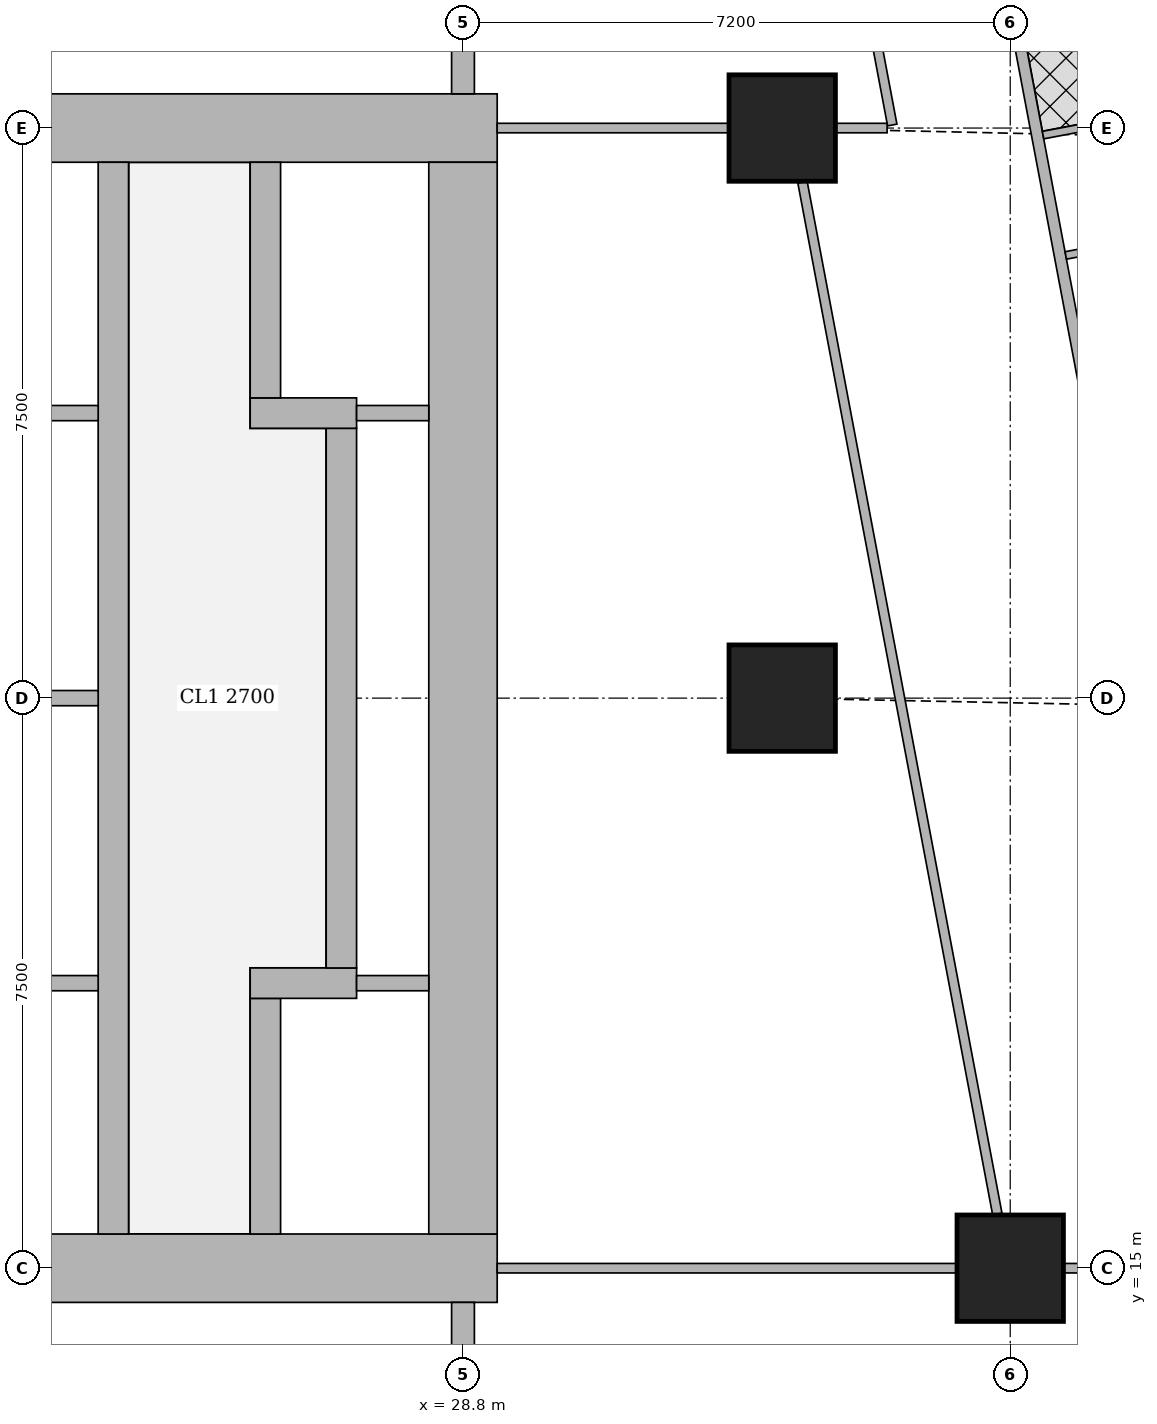
"""IFC4 building model, lengths in metres.
Left out: names, types, materials, properties, quantities, classifications, styles, units other than length and angle.
Written with IfcOpenShell. Run it as: python <this file> out.ifc"""

import sys

from ifc_helpers import new_model, si_unit, direction, frame, frame_2d, origin, origin_2d, place, context, subcontext, project, spatial, rectangle, extrude, element, fill, save


model = new_model("IFC4")
c1 = context("Model", 3, precision=1e-05, world=origin(), true_north=direction((0.0, 1.0)))
c2 = subcontext(c1, "Body", "Model", "MODEL_VIEW")
j1 = project(units=[si_unit("LENGTHUNIT", "METRE"), si_unit("PLANEANGLEUNIT", "RADIAN")], contexts=[c1])
p1 = place(None, origin())
s1 = spatial("IfcSite", under=j1, at=p1, CompositionType="ELEMENT")
p2 = place(p1, origin())
s2 = spatial("IfcBuilding", under=s1, at=p2, CompositionType="ELEMENT")
p3 = place(p2, frame((0.0, 0.0, 285.35)))
s3 = spatial("IfcBuildingStorey", under=s2, at=p3, CompositionType="ELEMENT", Elevation=285.35)
for number, where, z_axis, x_axis in (
    (1, (36.0, 15.0, 0.0), (0.0, 0.0, 1.0), (1.0, 0.0, 0.0)),
    (2, (33.0, 22.5, 0.0), (0.0, 0.0, 1.0), (1.0, 0.0, 0.0)),
    (3, (33.0, 30.0, 0.0), (0.0, 0.0, 1.0), (1.0, 0.0, 0.0)),
):
    element("IfcColumn", number, at=place(p3, frame(where, z_axis=z_axis, x_axis=x_axis)), inside=s3, PredefinedType="COLUMN", context=c2, shape_type="SweptSolid", body=[
        extrude(rectangle(XDim=1.4, YDim=1.4, at=origin_2d()), origin(), (0.0, 0.0, 1.0), 3.75),
    ])
p4 = place(p3, frame((13.95, 15.0, 0.0), z_axis=(0.0, 0.0, 1.0), x_axis=(1.0, 0.0, 0.0)))
e4 = element("IfcWall", 4, at=p4, inside=s3, PredefinedType="SHEAR", context=c2, shape_type="SweptSolid", body=[
    extrude(rectangle(XDim=15.3, YDim=0.9, at=frame_2d((7.65, 0.0))), origin(), (0.0, 0.0, 1.0), 3.75),
])
p5 = place(p4, frame((4.45, 0.0, 0.0)))
e5 = element("IfcOpeningElement", 5, at=p5, cuts=e4, PredefinedType="OPENING", context=c2, shape_type="SweptSolid", body=[
    extrude(rectangle(XDim=1.8, YDim=2.1, at=frame_2d((0.9, 1.05))), frame((0.0, 0.46, 0.0), z_axis=(0.0, -1.0, 0.0), x_axis=(1.0, 0.0, 0.0)), (0.0, 0.0, 1.0), 0.92),
])
p6 = place(p4, frame((10.7, 0.0, 0.0)))
e6 = element("IfcOpeningElement", 6, at=p6, cuts=e4, PredefinedType="OPENING", context=c2, shape_type="SweptSolid", body=[
    extrude(rectangle(XDim=1.1, YDim=2.1, at=frame_2d((0.55, 1.05))), frame((0.0, 0.46, 0.0), z_axis=(0.0, -1.0, 0.0), x_axis=(1.0, 0.0, 0.0)), (0.0, 0.0, 1.0), 0.92),
])
p7 = place(p3, frame((13.95, 30.0, 0.0), z_axis=(0.0, 0.0, 1.0), x_axis=(1.0, 0.0, 0.0)))
e7 = element("IfcWall", 7, at=p7, inside=s3, PredefinedType="SHEAR", context=c2, shape_type="SweptSolid", body=[
    extrude(rectangle(XDim=15.3, YDim=0.9, at=frame_2d((7.65, 0.0))), origin(), (0.0, 0.0, 1.0), 3.75),
])
p8 = place(p7, frame((4.45, 0.0, 0.0)))
e8 = element("IfcOpeningElement", 8, at=p8, cuts=e7, PredefinedType="OPENING", context=c2, shape_type="SweptSolid", body=[
    extrude(rectangle(XDim=1.8, YDim=2.1, at=frame_2d((0.9, 1.05))), frame((0.0, 0.46, 0.0), z_axis=(0.0, -1.0, 0.0), x_axis=(1.0, 0.0, 0.0)), (0.0, 0.0, 1.0), 0.92),
])
p9 = place(p7, frame((10.7, 0.0, 0.0)))
e9 = element("IfcOpeningElement", 9, at=p9, cuts=e7, PredefinedType="OPENING", context=c2, shape_type="SweptSolid", body=[
    extrude(rectangle(XDim=1.1, YDim=2.1, at=frame_2d((0.55, 1.05))), frame((0.0, 0.46, 0.0), z_axis=(0.0, -1.0, 0.0), x_axis=(1.0, 0.0, 0.0)), (0.0, 0.0, 1.0), 0.92),
])
p10 = place(p3, frame((28.8, 15.45, 0.0), z_axis=(0.0, 0.0, 1.0), x_axis=(0.0, 1.0, 0.0)))
e10 = element("IfcWall", 10, at=p10, inside=s3, PredefinedType="SHEAR", context=c2, shape_type="SweptSolid", body=[
    extrude(rectangle(XDim=14.1, YDim=0.9, at=frame_2d((7.05, 0.0))), origin(), (0.0, 0.0, 1.0), 3.75),
])
p11 = place(p3, frame((24.2, 15.45, 0.0), z_axis=(0.0, 0.0, 1.0), x_axis=(0.0, 1.0, 0.0)))
e11 = element("IfcWall", 11, at=p11, inside=s3, PredefinedType="SHEAR", context=c2, shape_type="SweptSolid", body=[
    extrude(rectangle(XDim=14.1, YDim=0.4, at=frame_2d((7.05, 0.0))), origin(), (0.0, 0.0, 1.0), 3.75),
])
p12 = place(p3, frame((26.2, 15.45, 0.0), z_axis=(0.0, 0.0, 1.0), x_axis=(0.0, 1.0, 0.0)))
e12 = element("IfcWall", 12, at=p12, inside=s3, PredefinedType="SHEAR", context=c2, shape_type="SweptSolid", body=[
    extrude(rectangle(XDim=3.1, YDim=0.4, at=frame_2d((1.55, 0.0))), origin(), (0.0, 0.0, 1.0), 3.75),
])
p13 = place(p12, frame((0.825, 0.0, 0.0)))
e13 = element("IfcOpeningElement", 13, at=p13, cuts=e12, PredefinedType="OPENING", context=c2, shape_type="SweptSolid", body=[
    extrude(rectangle(XDim=1.2, YDim=2.1, at=frame_2d((0.6, 1.05))), frame((0.0, 0.21, 0.0), z_axis=(0.0, -1.0, 0.0), x_axis=(1.0, 0.0, 0.0)), (0.0, 0.0, 1.0), 0.42),
])
p14 = place(p3, frame((26.0, 18.75, 0.0), z_axis=(0.0, 0.0, 1.0), x_axis=(1.0, 0.0, 0.0)))
e14 = element("IfcWall", 14, at=p14, inside=s3, PredefinedType="SHEAR", context=c2, shape_type="SweptSolid", body=[
    extrude(rectangle(XDim=1.4, YDim=0.4, at=frame_2d((0.7, 0.0))), origin(), (0.0, 0.0, 1.0), 3.75),
])
p15 = place(p3, frame((27.2, 18.95, 0.0), z_axis=(0.0, 0.0, 1.0), x_axis=(0.0, 1.0, 0.0)))
e15 = element("IfcWall", 15, at=p15, inside=s3, PredefinedType="SHEAR", context=c2, shape_type="SweptSolid", body=[
    extrude(rectangle(XDim=7.1, YDim=0.4, at=frame_2d((3.55, 0.0))), origin(), (0.0, 0.0, 1.0), 3.75),
])
p16 = place(p3, frame((26.0, 26.25, 0.0), z_axis=(0.0, 0.0, 1.0), x_axis=(1.0, 0.0, 0.0)))
e16 = element("IfcWall", 16, at=p16, inside=s3, PredefinedType="SHEAR", context=c2, shape_type="SweptSolid", body=[
    extrude(rectangle(XDim=1.4, YDim=0.4, at=frame_2d((0.7, 0.0))), origin(), (0.0, 0.0, 1.0), 3.75),
])
p17 = place(p3, frame((26.2, 26.45, 0.0), z_axis=(0.0, 0.0, 1.0), x_axis=(0.0, 1.0, 0.0)))
e17 = element("IfcWall", 17, at=p17, inside=s3, PredefinedType="SHEAR", context=c2, shape_type="SweptSolid", body=[
    extrude(rectangle(XDim=3.1, YDim=0.4, at=frame_2d((1.55, 0.0))), origin(), (0.0, 0.0, 1.0), 3.75),
])
p18 = place(p17, frame((1.075, 0.0, 0.0)))
e18 = element("IfcOpeningElement", 18, at=p18, cuts=e17, PredefinedType="OPENING", context=c2, shape_type="SweptSolid", body=[
    extrude(rectangle(XDim=1.2, YDim=2.1, at=frame_2d((0.6, 1.05))), frame((0.0, 0.21, 0.0), z_axis=(0.0, -1.0, 0.0), x_axis=(1.0, 0.0, 0.0)), (0.0, 0.0, 1.0), 0.42),
])
for number, where, z_axis, x_axis in (
    (19, (28.8, 10.35, 0.0), (0.0, 0.0, 1.0), (0.0, 1.0, 0.0)),
    (20, (28.8, 30.45, 0.0), (0.0, 0.0, 1.0), (0.0, 1.0, 0.0)),
):
    element("IfcWall", number, at=place(p3, frame(where, z_axis=z_axis, x_axis=x_axis)), inside=s3, PredefinedType="SHEAR", context=c2, shape_type="SweptSolid", body=[
        extrude(rectangle(XDim=4.2, YDim=0.3, at=frame_2d((2.1, 0.0))), origin(), (0.0, 0.0, 1.0), 3.75),
    ])
p19 = place(p3, frame((34.036, 42.186, 0.0), z_axis=(0.0, 0.0, 1.0), x_axis=(0.185593518645, -0.9826266055, 0.0)))
e21 = element("IfcWall", 21, at=p19, inside=s3, PredefinedType="SOLIDWALL", context=c2, shape_type="SweptSolid", body=[
    extrude(rectangle(XDim=35.961, YDim=0.15, at=frame_2d((17.98, 0.0))), origin(), (0.0, 0.0, 1.0), 2.5),
])
p20 = place(p19, frame((19.345, 0.0, 0.0)))
e22 = element("IfcOpeningElement", 22, at=p20, cuts=e21, PredefinedType="OPENING", context=c2, shape_type="SweptSolid", body=[
    extrude(rectangle(XDim=1.0, YDim=2.1, at=frame_2d((0.5, 1.05))), frame((0.0, 0.085, 0.0), z_axis=(0.0, -1.0, 0.0), x_axis=(1.0, 0.0, 0.0)), (0.0, 0.0, 1.0), 0.17),
])
p21 = place(p19, frame((33.774, 0.0, 0.0)))
e23 = element("IfcOpeningElement", 23, at=p21, cuts=e21, PredefinedType="OPENING", context=c2, shape_type="SweptSolid", body=[
    extrude(rectangle(XDim=1.0, YDim=2.1, at=frame_2d((0.5, 1.05))), frame((0.0, 0.085, 0.0), z_axis=(0.0, -1.0, 0.0), x_axis=(1.0, 0.0, 0.0)), (0.0, 0.0, 1.0), 0.17),
])
p22 = place(p3, frame((39.948, 28.932, 0.0), z_axis=(0.0, 0.0, 1.0), x_axis=(-0.982610347627, -0.185679575441, 0.0)))
e24 = element("IfcWall", 24, at=p22, inside=s3, PredefinedType="PARTITIONING", context=c2, shape_type="SweptSolid", body=[
    extrude(rectangle(XDim=3.274, YDim=0.1, at=frame_2d((1.637, 0.0))), origin(), (0.0, 0.0, 1.0), 3.5),
])
p23 = place(p3, frame((39.649, 30.515, 0.0), z_axis=(0.0, 0.0, 1.0), x_axis=(-0.982610347627, -0.185679575441, 0.0)))
e25 = element("IfcWall", 25, at=p23, inside=s3, PredefinedType="PARTITIONING", context=c2, shape_type="SweptSolid", body=[
    extrude(rectangle(XDim=3.274, YDim=0.1, at=frame_2d((1.637, 0.0))), origin(), (0.0, 0.0, 1.0), 2.5),
])
p24 = place(p3, frame((34.448, 30.04, 0.0), z_axis=(0.0, 0.0, 1.0), x_axis=(-0.185749459238, 0.982597139418, 0.0)))
e26 = element("IfcWall", 26, at=p24, inside=s3, PredefinedType="PARTITIONING", context=c2, shape_type="SweptSolid", body=[
    extrude(rectangle(XDim=4.883, YDim=0.125, at=frame_2d((2.441, 0.0))), origin(), (0.0, 0.0, 1.0), 2.5),
])
p25 = place(p24, frame((0.95, 0.0, 0.0)))
e27 = element("IfcOpeningElement", 27, at=p25, cuts=e26, PredefinedType="OPENING", context=c2, shape_type="SweptSolid", body=[
    extrude(rectangle(XDim=1.0, YDim=2.1, at=frame_2d((0.5, 1.05))), frame((0.0, 0.073, 0.0), z_axis=(0.0, -1.0, 0.0), x_axis=(1.0, 0.0, 0.0)), (0.0, 0.0, 1.0), 0.145),
])
p26 = place(p24, frame((3.225, 0.0, 0.0)))
e28 = element("IfcOpeningElement", 28, at=p26, cuts=e26, PredefinedType="OPENING", context=c2, shape_type="SweptSolid", body=[
    extrude(rectangle(XDim=1.0, YDim=2.1, at=frame_2d((0.5, 1.05))), frame((0.0, 0.073, 0.0), z_axis=(0.0, -1.0, 0.0), x_axis=(1.0, 0.0, 0.0)), (0.0, 0.0, 1.0), 0.145),
])
p27 = place(p3, frame((35.83, 15.713, 0.0), z_axis=(0.0, 0.0, 1.0), x_axis=(-0.185534724166, 0.982637708481, 0.0)))
e29 = element("IfcWall", 29, at=p27, inside=s3, PredefinedType="PARTITIONING", context=c2, shape_type="SweptSolid", body=[
    extrude(rectangle(XDim=13.814, YDim=0.125, at=frame_2d((6.907, 0.0))), origin(), (0.0, 0.0, 1.0), 2.5),
])
p28 = place(p27, frame((5.35, 0.0, 0.0)))
e30 = element("IfcOpeningElement", 30, at=p28, cuts=e29, PredefinedType="OPENING", context=c2, shape_type="SweptSolid", body=[
    extrude(rectangle(XDim=1.0, YDim=2.1, at=frame_2d((0.5, 1.05))), frame((0.0, 0.073, 0.0), z_axis=(0.0, -1.0, 0.0), x_axis=(1.0, 0.0, 0.0)), (0.0, 0.0, 1.0), 0.145),
])
p29 = place(p3, frame((29.25, 15.0, 0.0), z_axis=(0.0, 0.0, 1.0), x_axis=(1.0, 0.0, 0.0)))
e31 = element("IfcWall", 31, at=p29, inside=s3, PredefinedType="PARTITIONING", context=c2, shape_type="SweptSolid", body=[
    extrude(rectangle(XDim=6.049, YDim=0.125, at=frame_2d((3.024, 0.0))), origin(), (0.0, 0.0, 1.0), 3.5),
])
p30 = place(p3, frame((36.701, 15.0, 0.0), z_axis=(0.0, 0.0, 1.0), x_axis=(1.0, 0.0, 0.0)))
e32 = element("IfcWall", 32, at=p30, inside=s3, PredefinedType="PARTITIONING", context=c2, shape_type="SweptSolid", body=[
    extrude(rectangle(XDim=0.526, YDim=0.125, at=frame_2d((0.263, 0.0))), origin(), (0.0, 0.0, 1.0), 3.5),
])
p31 = place(p3, frame((29.25, 30.0, 0.0), z_axis=(0.0, 0.0, 1.0), x_axis=(1.0, 0.0, 0.0)))
e33 = element("IfcWall", 33, at=p31, inside=s3, PredefinedType="PARTITIONING", context=c2, shape_type="SweptSolid", body=[
    extrude(rectangle(XDim=3.049, YDim=0.125, at=frame_2d((1.524, 0.0))), origin(), (0.0, 0.0, 1.0), 3.5),
])
p32 = place(p3, frame((33.701, 30.0, 0.0), z_axis=(0.0, 0.0, 1.0), x_axis=(1.0, 0.0, 0.0)))
e34 = element("IfcWall", 34, at=p32, inside=s3, PredefinedType="PARTITIONING", context=c2, shape_type="SweptSolid", body=[
    extrude(rectangle(XDim=0.679, YDim=0.125, at=frame_2d((0.339, 0.0))), origin(), (0.0, 0.0, 1.0), 2.5),
])
for number, where, z_axis, x_axis in (
    (35, (21.8, 18.75, 0.0), (0.0, 0.0, 1.0), (1.0, 0.0, 0.0)),
    (36, (21.8, 22.5, 0.0), (0.0, 0.0, 1.0), (1.0, 0.0, 0.0)),
    (37, (21.8, 26.25, 0.0), (0.0, 0.0, 1.0), (1.0, 0.0, 0.0)),
):
    element("IfcWall", number, at=place(p3, frame(where, z_axis=z_axis, x_axis=x_axis)), inside=s3, PredefinedType="SOLIDWALL", context=c2, shape_type="SweptSolid", body=[
        extrude(rectangle(XDim=2.2, YDim=0.2, at=frame_2d((1.1, 0.0))), origin(), (0.0, 0.0, 1.0), 3.5),
    ])
for number, where, z_axis, x_axis in (
    (38, (27.4, 18.75, 0.0), (0.0, 0.0, 1.0), (1.0, 0.0, 0.0)),
    (39, (27.4, 26.25, 0.0), (0.0, 0.0, 1.0), (1.0, 0.0, 0.0)),
):
    element("IfcWall", number, at=place(p3, frame(where, z_axis=z_axis, x_axis=x_axis)), inside=s3, PredefinedType="SOLIDWALL", context=c2, shape_type="SweptSolid", body=[
        extrude(rectangle(XDim=0.95, YDim=0.2, at=frame_2d((0.475, 0.0))), origin(), (0.0, 0.0, 1.0), 3.5),
    ])
p33 = place(p28, origin())
e40 = element("IfcDoor", 40, at=p33, inside=s3, OperationType="SINGLE_SWING_LEFT", PredefinedType="DOOR", context=c2, shape_type="SweptSolid", body=[
    extrude(rectangle(XDim=1.0, YDim=2.1, at=frame_2d((0.5, 1.05))), frame((0.0, 0.025, 0.0), z_axis=(0.0, -1.0, 0.0), x_axis=(1.0, 0.0, 0.0)), (0.0, 0.0, 1.0), 0.05),
])
fill(e30, e40)
p34 = place(p25, origin())
e41 = element("IfcDoor", 41, at=p34, inside=s3, OperationType="SINGLE_SWING_RIGHT", PredefinedType="DOOR", context=c2, shape_type="SweptSolid", body=[
    extrude(rectangle(XDim=1.0, YDim=2.1, at=frame_2d((0.5, 1.05))), frame((0.0, 0.025, 0.0), z_axis=(0.0, -1.0, 0.0), x_axis=(1.0, 0.0, 0.0)), (0.0, 0.0, 1.0), 0.05),
])
fill(e27, e41)
p35 = place(p6, origin())
e42 = element("IfcDoor", 42, at=p35, inside=s3, OperationType="SINGLE_SWING_RIGHT", PredefinedType="DOOR", context=c2, shape_type="SweptSolid", body=[
    extrude(rectangle(XDim=1.1, YDim=2.1, at=frame_2d((0.55, 1.05))), frame((0.0, 0.025, 0.0), z_axis=(0.0, -1.0, 0.0), x_axis=(1.0, 0.0, 0.0)), (0.0, 0.0, 1.0), 0.05),
])
fill(e6, e42)
p36 = place(p9, origin())
e43 = element("IfcDoor", 43, at=p36, inside=s3, OperationType="SINGLE_SWING_RIGHT", PredefinedType="DOOR", context=c2, shape_type="SweptSolid", body=[
    extrude(rectangle(XDim=1.1, YDim=2.1, at=frame_2d((0.55, 1.05))), frame((0.0, 0.025, 0.0), z_axis=(0.0, -1.0, 0.0), x_axis=(1.0, 0.0, 0.0)), (0.0, 0.0, 1.0), 0.05),
])
fill(e9, e43)
p37 = place(p13, origin())
e44 = element("IfcDoor", 44, at=p37, inside=s3, OperationType="DOUBLE_DOOR_SLIDING", PredefinedType="DOOR", context=c2, shape_type="SweptSolid", body=[
    extrude(rectangle(XDim=1.2, YDim=2.1, at=frame_2d((0.6, 1.05))), frame((0.0, 0.025, 0.0), z_axis=(0.0, -1.0, 0.0), x_axis=(1.0, 0.0, 0.0)), (0.0, 0.0, 1.0), 0.05),
])
fill(e13, e44)
p38 = place(p18, origin())
e45 = element("IfcDoor", 45, at=p38, inside=s3, OperationType="DOUBLE_DOOR_SLIDING", PredefinedType="DOOR", context=c2, shape_type="SweptSolid", body=[
    extrude(rectangle(XDim=1.2, YDim=2.1, at=frame_2d((0.6, 1.05))), frame((0.0, 0.025, 0.0), z_axis=(0.0, -1.0, 0.0), x_axis=(1.0, 0.0, 0.0)), (0.0, 0.0, 1.0), 0.05),
])
fill(e18, e45)
save(model, sys.argv[1])
